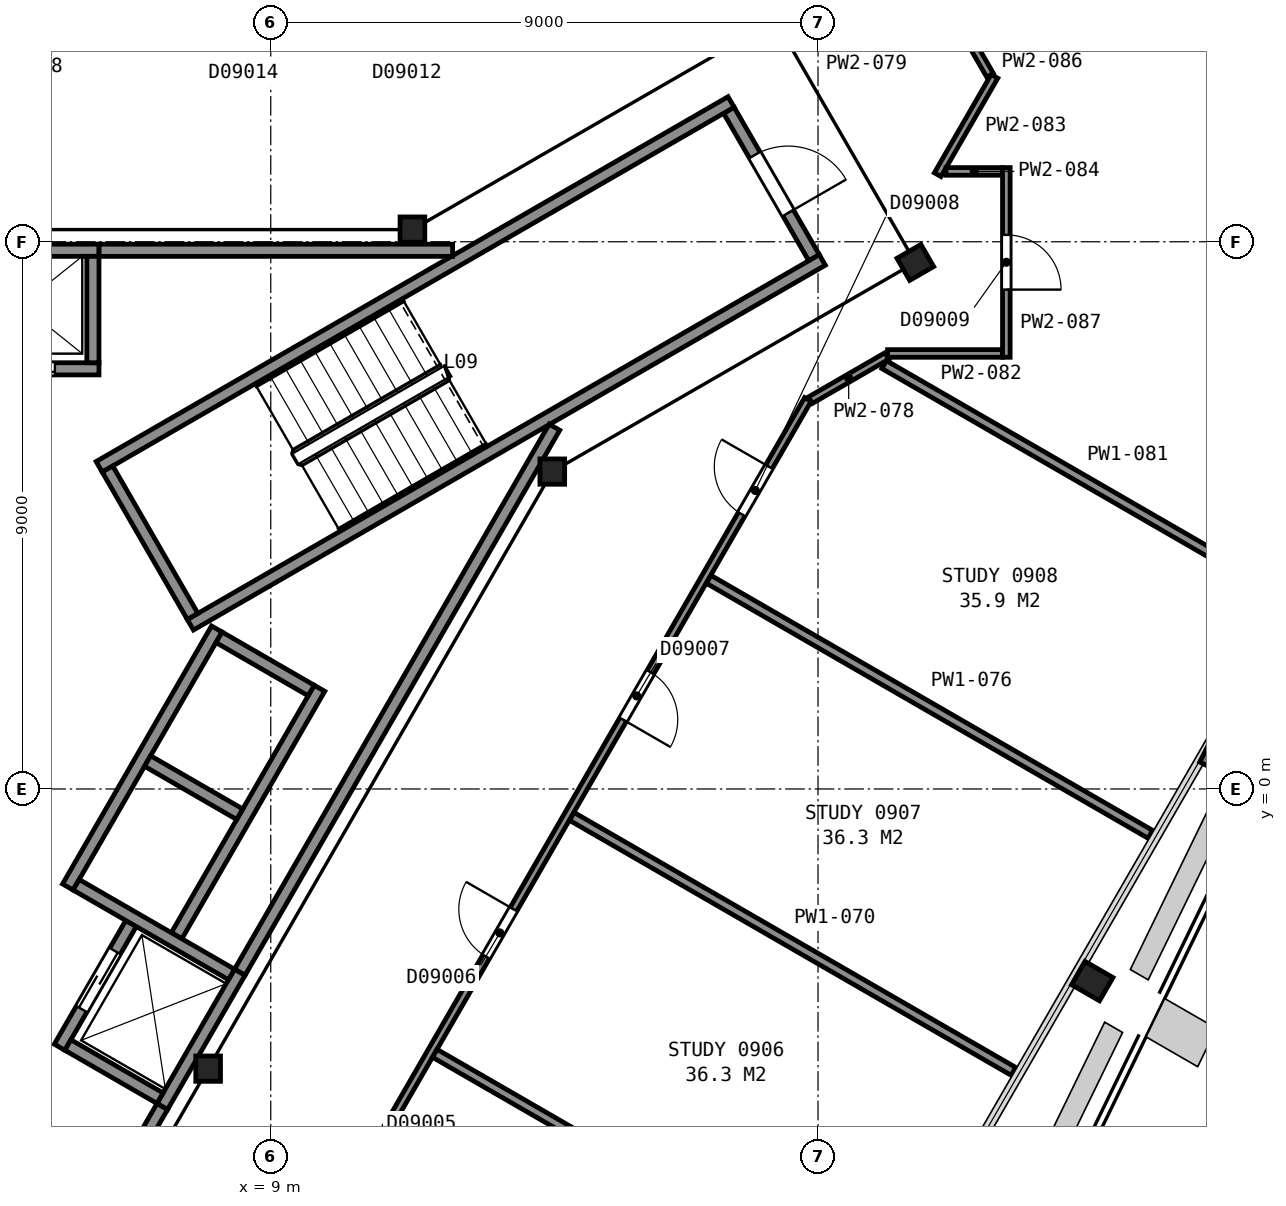
"""IFC4 building model, lengths in metres.
Left out: names, types, materials, properties, quantities, classifications, styles, units other than length and angle.
Written with IfcOpenShell. Run it as: python <this file> out.ifc"""

import sys

from ifc_helpers import new_model, si_unit, direction, frame, frame_2d, origin, origin_2d, place, context, subcontext, project, spatial, rectangle, i_section, extrude, element, fill, save


model = new_model("IFC4")
c1 = context("Model", 3, precision=1e-05, world=origin(), true_north=direction((0.0, 1.0)))
c2 = subcontext(c1, "Body", "Model", "MODEL_VIEW")
j1 = project(units=[si_unit("LENGTHUNIT", "METRE"), si_unit("PLANEANGLEUNIT", "RADIAN")], contexts=[c1])
p1 = place(None, origin())
s1 = spatial("IfcSite", under=j1, at=p1, CompositionType="ELEMENT")
p2 = place(p1, origin())
s2 = spatial("IfcBuilding", under=s1, at=p2, CompositionType="ELEMENT")
p3 = place(p2, frame((0.0, 0.0, 47.6)))
s3 = spatial("IfcBuildingStorey", under=s2, at=p3, CompositionType="ELEMENT", Elevation=47.6)
p4 = place(p3, frame((22.51, -3.16, 0.025), z_axis=(0.0, 0.0, 1.0), x_axis=(-0.5, -0.866025403784, 0.0)))
e1 = element("IfcColumn", 1, at=p4, inside=s3, PredefinedType="COLUMN", context=c2, shape_type="SweptSolid", body=[
    extrude(i_section(OverallWidth=0.442, OverallDepth=0.531, WebThickness=0.066, FlangeThickness=0.106, FilletRadius=0.015, at=origin_2d()), origin(), (0.0, 0.0, 1.0), 3.575),
])
p5 = place(p3, frame((13.63, 5.22, 0.0), z_axis=(0.0, 0.0, 1.0), x_axis=(1.0, 0.0, 0.0)))
e2 = element("IfcColumn", 2, at=p5, inside=s3, PredefinedType="COLUMN", context=c2, shape_type="SweptSolid", body=[
    extrude(i_section(OverallWidth=0.406, OverallDepth=0.417, WebThickness=0.03, FlangeThickness=0.048, FilletRadius=0.015, at=origin_2d()), origin(), (0.0, 0.0, 1.0), 3.6),
])
p6 = place(p3, frame((19.6, 8.66, 0.0), z_axis=(0.0, 0.0, 1.0), x_axis=(0.5, -0.866025403784, 0.0)))
e3 = element("IfcColumn", 3, at=p6, inside=s3, PredefinedType="COLUMN", context=c2, shape_type="SweptSolid", body=[
    extrude(i_section(OverallWidth=0.419, OverallDepth=0.455, WebThickness=0.042, FlangeThickness=0.068, FilletRadius=0.015, at=origin_2d()), origin(), (0.0, 0.0, 1.0), 3.6),
])
for number, where, z_axis, x_axis in (
    (4, (11.33, 9.2, 0.0), (0.0, 0.0, 1.0), (1.0, 0.0, 0.0)),
    (5, (7.97, -4.6, 0.0), (0.0, 0.0, 1.0), (1.0, 0.0, 0.0)),
):
    element("IfcColumn", number, at=place(p3, frame(where, z_axis=z_axis, x_axis=x_axis)), inside=s3, PredefinedType="COLUMN", context=c2, shape_type="SweptSolid", body=[
        extrude(i_section(OverallWidth=0.406, OverallDepth=0.417, WebThickness=0.03, FlangeThickness=0.048, FilletRadius=0.015, at=origin_2d()), origin(), (0.0, 0.0, 1.0), 3.6),
    ])
p7 = place(p3, frame((17.934, 8.738, 0.0), z_axis=(0.0, 0.0, 1.0), x_axis=(-0.49998411664, 0.866034573852, 0.0)))
e6 = element("IfcWall", 6, at=p7, inside=s3, PredefinedType="PARTITIONING", context=c2, shape_type="SweptSolid", body=[
    extrude(rectangle(XDim=2.8, YDim=0.2, at=frame_2d((1.4, 0.0))), origin(), (0.0, 0.0, 1.0), 3.35),
])
p8 = place(p7, frame((0.85, 0.0, 0.0)))
e7 = element("IfcOpeningElement", 7, at=p8, cuts=e6, PredefinedType="OPENING", context=c2, shape_type="SweptSolid", body=[
    extrude(rectangle(XDim=1.1, YDim=2.1, at=frame_2d((0.55, 1.05))), frame((0.0, 0.11, 0.0), z_axis=(0.0, -1.0, 0.0), x_axis=(1.0, 0.0, 0.0)), (0.0, 0.0, 1.0), 0.22),
])
for number, where, z_axis, x_axis in (
    (8, (6.178, 5.299, 0.0), (0.0, 0.0, 1.0), (0.866, 0.5, 0.0)),
    (9, (7.678, 2.701, 0.0), (0.0, 0.0, 1.0), (0.866, 0.5, 0.0)),
):
    element("IfcWall", number, at=place(p3, frame(where, z_axis=z_axis, x_axis=x_axis)), inside=s3, PredefinedType="PARTITIONING", context=c2, shape_type="SweptSolid", body=[
        extrude(rectangle(XDim=12.0, YDim=0.2, at=frame_2d((6.0, 0.0))), origin(), (0.0, 0.0, 1.0), 3.35),
    ])
p9 = place(p3, frame((7.715, 2.838, 0.0), z_axis=(0.0, 0.0, 1.0), x_axis=(-0.500049511043, 0.865996816683, 0.0)))
e10 = element("IfcWall", 10, at=p9, inside=s3, PredefinedType="PARTITIONING", context=c2, shape_type="SweptSolid", body=[
    extrude(rectangle(XDim=2.8, YDim=0.2, at=frame_2d((1.4, 0.0))), origin(), (0.0, 0.0, 1.0), 3.35),
])
p10 = place(p3, frame((3.625, 6.91, 0.0), z_axis=(0.0, 0.0, 1.0), x_axis=(1.0, 0.0, 0.0)))
e11 = element("IfcWall", 11, at=p10, inside=s3, PredefinedType="PARTITIONING", context=c2, shape_type="SweptSolid", body=[
    extrude(rectangle(XDim=2.55, YDim=0.2, at=frame_2d((1.275, 0.0))), origin(), (0.0, 0.0, 1.0), 3.6),
])
p11 = place(p10, frame((0.725, 0.0, 0.0)))
e12 = element("IfcOpeningElement", 12, at=p11, cuts=e11, PredefinedType="OPENING", context=c2, shape_type="SweptSolid", body=[
    extrude(rectangle(XDim=1.1, YDim=2.1, at=frame_2d((0.55, 1.05))), frame((0.0, 0.11, 0.0), z_axis=(0.0, -1.0, 0.0), x_axis=(1.0, 0.0, 0.0)), (0.0, 0.0, 1.0), 0.22),
])
p12 = place(p3, frame((3.625, 8.86, 0.0), z_axis=(0.0, 0.0, 1.0), x_axis=(1.0, 0.0, 0.0)))
e13 = element("IfcWall", 13, at=p12, inside=s3, PredefinedType="PARTITIONING", context=c2, shape_type="SweptSolid", body=[
    extrude(rectangle(XDim=2.55, YDim=0.2, at=frame_2d((1.275, 0.0))), origin(), (0.0, 0.0, 1.0), 3.6),
])
p13 = place(p3, frame((7.216, -5.222, 0.0), z_axis=(0.0, 0.0, 1.0), x_axis=(0.499990435942, 0.866030925526, 0.0)))
e14 = element("IfcWall", 14, at=p13, inside=s3, PredefinedType="PARTITIONING", context=c2, shape_type="SweptSolid", body=[
    extrude(rectangle(XDim=2.55, YDim=0.2, at=frame_2d((1.275, 0.0))), origin(), (0.0, 0.0, 1.0), 3.6),
])
p14 = place(p3, frame((7.451, -2.414, 0.0), z_axis=(0.0, 0.0, 1.0), x_axis=(0.500016218704, 0.866016039709, 0.0)))
e15 = element("IfcWall", 15, at=p14, inside=s3, PredefinedType="PARTITIONING", context=c2, shape_type="SweptSolid", body=[
    extrude(rectangle(XDim=4.7, YDim=0.2, at=frame_2d((2.35, 0.0))), origin(), (0.0, 0.0, 1.0), 3.6),
])
p15 = place(p3, frame((5.527, -4.247, 0.0), z_axis=(0.0, 0.0, 1.0), x_axis=(0.499938297808, 0.866061024631, 0.0)))
e16 = element("IfcWall", 16, at=p15, inside=s3, PredefinedType="PARTITIONING", context=c2, shape_type="SweptSolid", body=[
    extrude(rectangle(XDim=2.35, YDim=0.2, at=frame_2d((1.175, 0.0))), origin(), (0.0, 0.0, 1.0), 3.6),
])
p16 = place(p15, frame((0.725, 0.0, 0.0)))
e17 = element("IfcOpeningElement", 17, at=p16, cuts=e16, PredefinedType="OPENING", context=c2, shape_type="SweptSolid", body=[
    extrude(rectangle(XDim=1.1, YDim=2.1, at=frame_2d((0.55, 1.05))), frame((0.0, 0.11, 0.0), z_axis=(0.0, -1.0, 0.0), x_axis=(1.0, 0.0, 0.0)), (0.0, 0.0, 1.0), 0.22),
])
p17 = place(p3, frame((5.663, -1.612, 0.0), z_axis=(0.0, 0.0, 1.0), x_axis=(0.49998122708, 0.866036242063, 0.0)))
e18 = element("IfcWall", 18, at=p17, inside=s3, PredefinedType="PARTITIONING", context=c2, shape_type="SweptSolid", body=[
    extrude(rectangle(XDim=4.9, YDim=0.2, at=frame_2d((2.45, 0.0))), origin(), (0.0, 0.0, 1.0), 3.6),
])
p18 = place(p3, frame((6.075, 7.01, 0.0), z_axis=(0.0, 0.0, 1.0), x_axis=(0.0, 1.0, 0.0)))
e19 = element("IfcWall", 19, at=p18, inside=s3, PredefinedType="PARTITIONING", context=c2, shape_type="SweptSolid", body=[
    extrude(rectangle(XDim=1.75, YDim=0.2, at=frame_2d((0.875, 0.0))), origin(), (0.0, 0.0, 1.0), 3.6),
])
p19 = place(p3, frame((9.665, 1.62, 0.0), z_axis=(0.0, 0.0, 1.0), x_axis=(-0.866002029911, 0.500040482552, 0.0)))
e20 = element("IfcWall", 20, at=p19, inside=s3, PredefinedType="PARTITIONING", context=c2, shape_type="SweptSolid", body=[
    extrude(rectangle(XDim=1.75, YDim=0.2, at=frame_2d((0.875, 0.0))), origin(), (0.0, 0.0, 1.0), 3.6),
])
p20 = place(p3, frame((8.49, -0.416, 0.0), z_axis=(0.0, 0.0, 1.0), x_axis=(-0.866036909293, 0.499980071345, 0.0)))
e21 = element("IfcWall", 21, at=p20, inside=s3, PredefinedType="PARTITIONING", context=c2, shape_type="SweptSolid", body=[
    extrude(rectangle(XDim=1.75, YDim=0.2, at=frame_2d((0.875, 0.0))), origin(), (0.0, 0.0, 1.0), 3.6),
])
p21 = place(p3, frame((8.354, -3.051, 0.0), z_axis=(0.0, 0.0, 1.0), x_axis=(-0.866060182126, 0.499939757307, 0.0)))
e22 = element("IfcWall", 22, at=p21, inside=s3, PredefinedType="PARTITIONING", context=c2, shape_type="SweptSolid", body=[
    extrude(rectangle(XDim=2.95, YDim=0.2, at=frame_2d((1.475, 0.0))), origin(), (0.0, 0.0, 1.0), 3.6),
])
p22 = place(p3, frame((7.179, -5.086, 0.0), z_axis=(0.0, 0.0, 1.0), x_axis=(-0.866036909293, 0.499980071345, 0.0)))
e23 = element("IfcWall", 23, at=p22, inside=s3, PredefinedType="PARTITIONING", context=c2, shape_type="SweptSolid", body=[
    extrude(rectangle(XDim=1.75, YDim=0.2, at=frame_2d((0.875, 0.0))), origin(), (0.0, 0.0, 1.0), 3.6),
])
p23 = place(p3, frame((5.906, -7.49, 0.0), z_axis=(0.0, 0.0, 1.0), x_axis=(0.500252727967, 0.865879442048, 0.0)))
e24 = element("IfcWall", 24, at=p23, inside=s3, PredefinedType="PARTITIONING", context=c2, shape_type="SweptSolid", body=[
    extrude(rectangle(XDim=2.617, YDim=0.2, at=frame_2d((1.309, 0.0))), origin(), (0.0, 0.0, 1.0), 3.35),
])
p24 = place(p3, frame((6.177, 8.86, 0.0), z_axis=(0.0, 0.0, 1.0), x_axis=(1.0, 0.0, 0.0)))
e25 = element("IfcWall", 25, at=p24, inside=s3, PredefinedType="PARTITIONING", context=c2, shape_type="SweptSolid", body=[
    extrude(rectangle(XDim=5.814, YDim=0.2, at=frame_2d((2.907, 0.0))), origin(), (0.0, 0.0, 1.0), 3.35),
])
p25 = place(p3, frame((8.492, -3.012, 0.0), z_axis=(0.0, 0.0, 1.0), x_axis=(0.499972957231, 0.866041016371, 0.0)))
e26 = element("IfcWall", 26, at=p25, inside=s3, PredefinedType="PARTITIONING", context=c2, shape_type="SweptSolid", body=[
    extrude(rectangle(XDim=10.349, YDim=0.2, at=frame_2d((5.174, 0.0))), origin(), (0.0, 0.0, 1.0), 3.35),
])
p26 = place(p3, frame((17.833, 6.406, 0.0), z_axis=(0.0, 0.0, 1.0), x_axis=(-0.500002884005, -0.866023738697, 0.0)))
e27 = element("IfcWall", 27, at=p26, inside=s3, PredefinedType="PARTITIONING", context=c2, shape_type="SweptSolid", body=[
    extrude(rectangle(XDim=28.135, YDim=0.125, at=frame_2d((14.067, 0.0))), origin(), (0.0, 0.0, 1.0), 2.613),
])
p27 = place(p26, frame((26.522, 0.0, 0.0)))
e28 = element("IfcOpeningElement", 28, at=p27, cuts=e27, PredefinedType="OPENING", context=c2, shape_type="SweptSolid", body=[
    extrude(rectangle(XDim=0.9, YDim=2.1, at=frame_2d((0.45, 1.05))), frame((0.0, 0.073, 0.0), z_axis=(0.0, -1.0, 0.0), x_axis=(1.0, 0.0, 0.0)), (0.0, 0.0, 1.0), 0.145),
])
p28 = place(p26, frame((23.184, 0.0, 0.0)))
e29 = element("IfcOpeningElement", 29, at=p28, cuts=e27, PredefinedType="OPENING", context=c2, shape_type="SweptSolid", body=[
    extrude(rectangle(XDim=0.9, YDim=2.1, at=frame_2d((0.45, 1.05))), frame((0.0, 0.073, 0.0), z_axis=(0.0, -1.0, 0.0), x_axis=(1.0, 0.0, 0.0)), (0.0, 0.0, 1.0), 0.145),
])
p29 = place(p26, frame((18.683, 0.0, 0.0)))
e30 = element("IfcOpeningElement", 30, at=p29, cuts=e27, PredefinedType="OPENING", context=c2, shape_type="SweptSolid", body=[
    extrude(rectangle(XDim=0.9, YDim=2.1, at=frame_2d((0.45, 1.05))), frame((0.0, 0.073, 0.0), z_axis=(0.0, -1.0, 0.0), x_axis=(1.0, 0.0, 0.0)), (0.0, 0.0, 1.0), 0.145),
])
p30 = place(p26, frame((14.182, 0.0, 0.0)))
e31 = element("IfcOpeningElement", 31, at=p30, cuts=e27, PredefinedType="OPENING", context=c2, shape_type="SweptSolid", body=[
    extrude(rectangle(XDim=0.9, YDim=2.1, at=frame_2d((0.45, 1.05))), frame((0.0, 0.073, 0.0), z_axis=(0.0, -1.0, 0.0), x_axis=(1.0, 0.0, 0.0)), (0.0, 0.0, 1.0), 0.145),
])
p31 = place(p26, frame((9.681, 0.0, 0.0)))
e32 = element("IfcOpeningElement", 32, at=p31, cuts=e27, PredefinedType="OPENING", context=c2, shape_type="SweptSolid", body=[
    extrude(rectangle(XDim=0.9, YDim=2.1, at=frame_2d((0.45, 1.05))), frame((0.0, 0.073, 0.0), z_axis=(0.0, -1.0, 0.0), x_axis=(1.0, 0.0, 0.0)), (0.0, 0.0, 1.0), 0.145),
])
p32 = place(p26, frame((5.18, 0.0, 0.0)))
e33 = element("IfcOpeningElement", 33, at=p32, cuts=e27, PredefinedType="OPENING", context=c2, shape_type="SweptSolid", body=[
    extrude(rectangle(XDim=0.9, YDim=2.1, at=frame_2d((0.45, 1.05))), frame((0.0, 0.073, 0.0), z_axis=(0.0, -1.0, 0.0), x_axis=(1.0, 0.0, 0.0)), (0.0, 0.0, 1.0), 0.145),
])
p33 = place(p26, frame((1.278, 0.0, 0.0)))
e34 = element("IfcOpeningElement", 34, at=p33, cuts=e27, PredefinedType="OPENING", context=c2, shape_type="SweptSolid", body=[
    extrude(rectangle(XDim=0.9, YDim=2.1, at=frame_2d((0.45, 1.05))), frame((0.0, 0.073, 0.0), z_axis=(0.0, -1.0, 0.0), x_axis=(1.0, 0.0, 0.0)), (0.0, 0.0, 1.0), 0.145),
])
p34 = place(p3, frame((11.697, -4.347, 0.0), z_axis=(0.0, 0.0, 1.0), x_axis=(0.866005348532, -0.500034735108, 0.0)))
e35 = element("IfcWall", 35, at=p34, inside=s3, PredefinedType="PARTITIONING", context=c2, shape_type="SweptSolid", body=[
    extrude(rectangle(XDim=8.392, YDim=0.15, at=frame_2d((4.196, 0.0))), origin(), (0.0, 0.0, 1.0), 2.613),
])
p35 = place(p3, frame((13.951, -0.452, 0.0), z_axis=(0.0, 0.0, 1.0), x_axis=(0.866027553047, -0.499996277349, 0.0)))
e36 = element("IfcWall", 36, at=p35, inside=s3, PredefinedType="PARTITIONING", context=c2, shape_type="SweptSolid", body=[
    extrude(rectangle(XDim=8.387, YDim=0.15, at=frame_2d((4.193, 0.0))), origin(), (0.0, 0.0, 1.0), 2.613),
])
p36 = place(p3, frame((16.202, 3.447, 0.0), z_axis=(0.0, 0.0, 1.0), x_axis=(0.866047434595, -0.499961839574, 0.0)))
e37 = element("IfcWall", 37, at=p36, inside=s3, PredefinedType="PARTITIONING", context=c2, shape_type="SweptSolid", body=[
    extrude(rectangle(XDim=8.387, YDim=0.15, at=frame_2d((4.193, 0.0))), origin(), (0.0, 0.0, 1.0), 2.613),
])
p37 = place(p3, frame((17.875, 6.395, 0.0), z_axis=(0.0, 0.0, 1.0), x_axis=(0.865894215669, 0.500227155672, 0.0)))
e38 = element("IfcWall", 38, at=p37, inside=s3, PredefinedType="PARTITIONING", context=c2, shape_type="SweptSolid", body=[
    extrude(rectangle(XDim=1.451, YDim=0.125, at=frame_2d((0.726, 0.0))), origin(), (0.0, 0.0, 1.0), 2.613),
])
p38 = place(p3, frame((19.088, 6.979, 0.0), z_axis=(0.0, 0.0, 1.0), x_axis=(0.865990629129, -0.500060226633, 0.0)))
e39 = element("IfcWall", 39, at=p38, inside=s3, PredefinedType="PARTITIONING", context=c2, shape_type="SweptSolid", body=[
    extrude(rectangle(XDim=7.654, YDim=0.15, at=frame_2d((3.827, 0.0))), origin(), (0.0, 0.0, 1.0), 2.613),
])
p39 = place(p3, frame((19.144, 7.163, 0.0), z_axis=(0.0, 0.0, 1.0), x_axis=(1.0, 0.0, 0.0)))
e40 = element("IfcWall", 40, at=p39, inside=s3, PredefinedType="PARTITIONING", context=c2, shape_type="SweptSolid", body=[
    extrude(rectangle(XDim=1.888, YDim=0.125, at=frame_2d((0.944, 0.0))), origin(), (0.0, 0.0, 1.0), 2.613),
])
p40 = place(p3, frame((19.968, 10.103, 0.0), z_axis=(0.0, 0.0, 1.0), x_axis=(0.500072997275, 0.865983254686, 0.0)))
e41 = element("IfcWall", 41, at=p40, inside=s3, PredefinedType="PARTITIONING", context=c2, shape_type="SweptSolid", body=[
    extrude(rectangle(XDim=1.869, YDim=0.125, at=frame_2d((0.935, 0.0))), origin(), (0.0, 0.0, 1.0), 2.613),
])
p41 = place(p3, frame((20.104, 10.157, 0.0), z_axis=(0.0, 0.0, 1.0), x_axis=(1.0, 0.0, 0.0)))
e42 = element("IfcWall", 42, at=p41, inside=s3, PredefinedType="PARTITIONING", context=c2, shape_type="SweptSolid", body=[
    extrude(rectangle(XDim=0.928, YDim=0.125, at=frame_2d((0.464, 0.0))), origin(), (0.0, 0.0, 1.0), 2.613),
])
p42 = place(p3, frame((20.582, 12.167, 0.0), z_axis=(0.0, 0.0, 1.0), x_axis=(0.500450775723, -0.86576499183, 0.0)))
e43 = element("IfcWall", 43, at=p42, inside=s3, PredefinedType="PARTITIONING", context=c2, shape_type="SweptSolid", body=[
    extrude(rectangle(XDim=0.493, YDim=0.125, at=frame_2d((0.247, 0.0))), origin(), (0.0, 0.0, 1.0), 2.613),
])
p43 = place(p3, frame((21.097, 10.219, 0.0), z_axis=(0.0, 0.0, 1.0), x_axis=(0.0, -1.0, 0.0)))
e44 = element("IfcWall", 44, at=p43, inside=s3, PredefinedType="PARTITIONING", context=c2, shape_type="SweptSolid", body=[
    extrude(rectangle(XDim=3.119, YDim=0.125, at=frame_2d((1.56, 0.0))), origin(), (0.0, 0.0, 1.0), 2.613),
])
p44 = place(p43, frame((1.106, 0.0, 0.0)))
e45 = element("IfcOpeningElement", 45, at=p44, cuts=e44, PredefinedType="OPENING", context=c2, shape_type="SweptSolid", body=[
    extrude(rectangle(XDim=0.9, YDim=2.1, at=frame_2d((0.45, 1.05))), frame((0.0, 0.073, 0.0), z_axis=(0.0, -1.0, 0.0), x_axis=(1.0, 0.0, 0.0)), (0.0, 0.0, 1.0), 0.145),
])
p45 = place(p8, origin())
e46 = element("IfcDoor", 46, at=p45, inside=s3, OperationType="SINGLE_SWING_LEFT", PredefinedType="DOOR", context=c2, shape_type="SweptSolid", body=[
    extrude(rectangle(XDim=1.1, YDim=2.1, at=frame_2d((0.55, 1.05))), frame((0.0, 0.025, 0.0), z_axis=(0.0, -1.0, 0.0), x_axis=(1.0, 0.0, 0.0)), (0.0, 0.0, 1.0), 0.05),
])
fill(e7, e46)
p46 = place(p11, origin())
e47 = element("IfcDoor", 47, at=p46, inside=s3, OperationType="SLIDING_TO_LEFT", PredefinedType="DOOR", context=c2, shape_type="SweptSolid", body=[
    extrude(rectangle(XDim=1.1, YDim=2.1, at=frame_2d((0.55, 1.05))), frame((0.0, 0.025, 0.0), z_axis=(0.0, -1.0, 0.0), x_axis=(1.0, 0.0, 0.0)), (0.0, 0.0, 1.0), 0.05),
])
fill(e12, e47)
p47 = place(p16, origin())
e48 = element("IfcDoor", 48, at=p47, inside=s3, OperationType="SLIDING_TO_LEFT", PredefinedType="DOOR", context=c2, shape_type="SweptSolid", body=[
    extrude(rectangle(XDim=1.1, YDim=2.1, at=frame_2d((0.55, 1.05))), frame((0.0, 0.025, 0.0), z_axis=(0.0, -1.0, 0.0), x_axis=(1.0, 0.0, 0.0)), (0.0, 0.0, 1.0), 0.05),
])
fill(e17, e48)
p48 = place(p31, origin())
e49 = element("IfcDoor", 49, at=p48, inside=s3, OperationType="SINGLE_SWING_LEFT", PredefinedType="DOOR", context=c2, shape_type="SweptSolid", body=[
    extrude(rectangle(XDim=0.9, YDim=2.1, at=frame_2d((0.45, 1.05))), frame((0.0, 0.025, 0.0), z_axis=(0.0, -1.0, 0.0), x_axis=(1.0, 0.0, 0.0)), (0.0, 0.0, 1.0), 0.05),
])
fill(e32, e49)
p49 = place(p32, origin())
e50 = element("IfcDoor", 50, at=p49, inside=s3, OperationType="SINGLE_SWING_RIGHT", PredefinedType="DOOR", context=c2, shape_type="SweptSolid", body=[
    extrude(rectangle(XDim=0.9, YDim=2.1, at=frame_2d((0.45, 1.05))), frame((0.0, 0.025, 0.0), z_axis=(0.0, -1.0, 0.0), x_axis=(1.0, 0.0, 0.0)), (0.0, 0.0, 1.0), 0.05),
])
fill(e33, e50)
p50 = place(p33, origin())
e51 = element("IfcDoor", 51, at=p50, inside=s3, OperationType="SINGLE_SWING_LEFT", PredefinedType="DOOR", context=c2, shape_type="SweptSolid", body=[
    extrude(rectangle(XDim=0.9, YDim=2.1, at=frame_2d((0.45, 1.05))), frame((0.0, 0.025, 0.0), z_axis=(0.0, -1.0, 0.0), x_axis=(1.0, 0.0, 0.0)), (0.0, 0.0, 1.0), 0.05),
])
fill(e34, e51)
p51 = place(p44, origin())
e52 = element("IfcDoor", 52, at=p51, inside=s3, OperationType="SINGLE_SWING_RIGHT", PredefinedType="DOOR", context=c2, shape_type="SweptSolid", body=[
    extrude(rectangle(XDim=0.9, YDim=2.1, at=frame_2d((0.45, 1.05))), frame((0.0, 0.025, 0.0), z_axis=(0.0, -1.0, 0.0), x_axis=(1.0, 0.0, 0.0)), (0.0, 0.0, 1.0), 0.05),
])
fill(e45, e52)
save(model, sys.argv[1])
